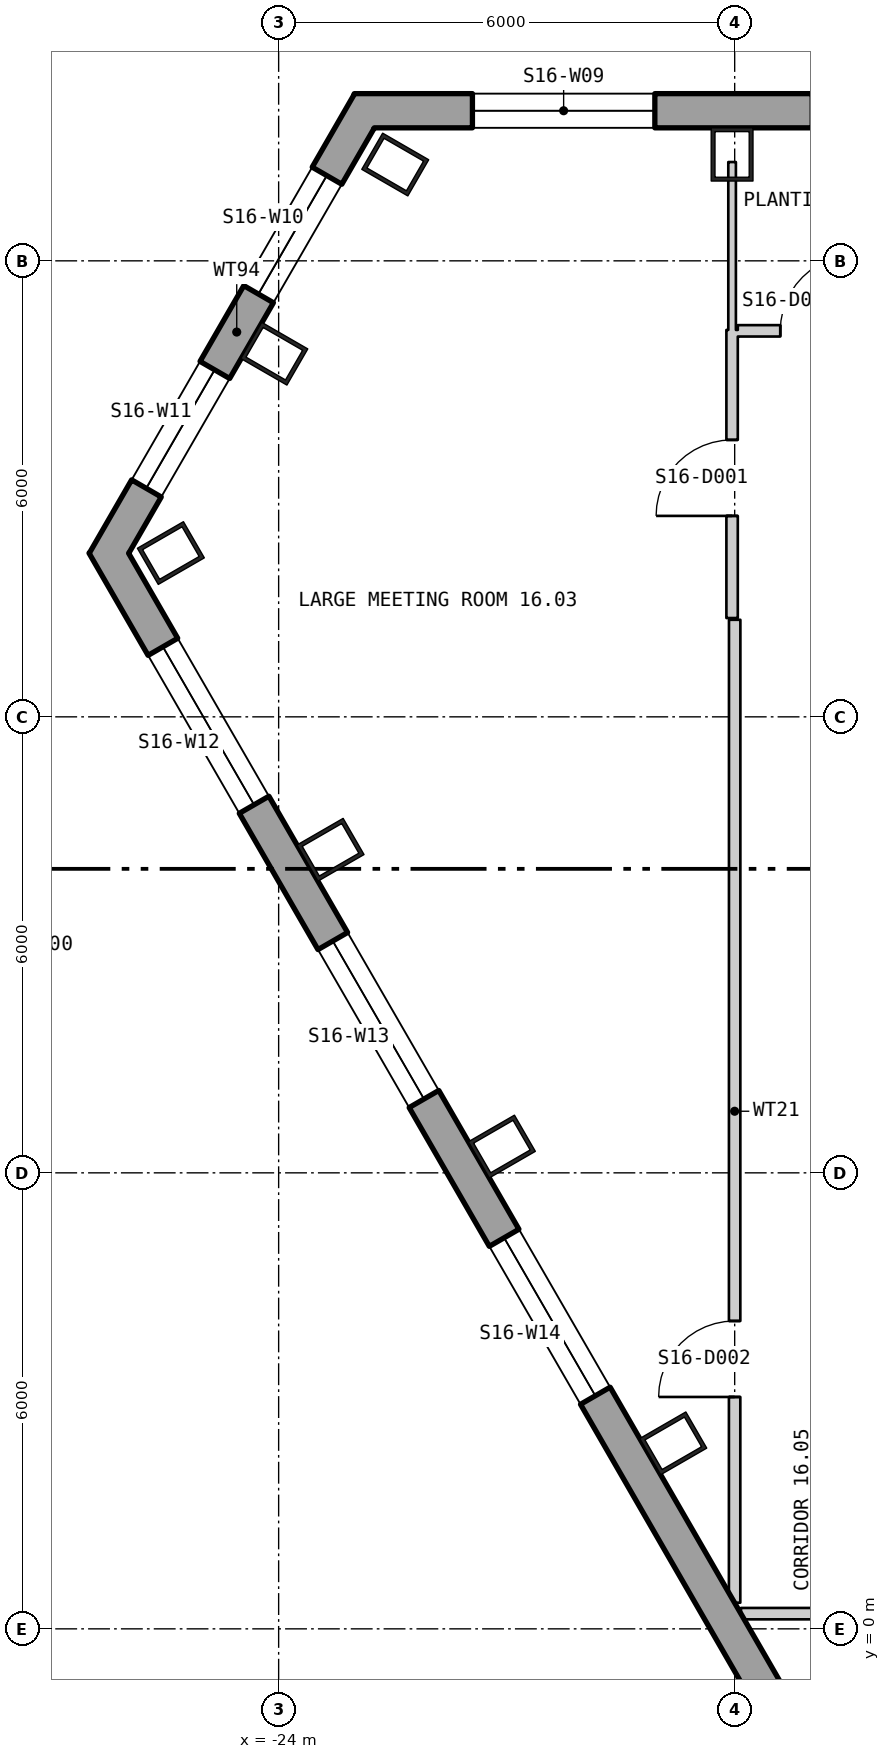
"""IFC4 building model, lengths in metres.
Left out: names, types, materials, properties, quantities, classifications, styles, units other than length and angle.
Written with IfcOpenShell. Run it as: python <this file> out.ifc"""

import sys

from ifc_helpers import new_model, si_unit, direction, frame, frame_2d, origin, origin_2d, place, context, subcontext, project, spatial, polyline, rectangle, hollow_rectangle, outline, extrude, element, fill, save


model = new_model("IFC4")
c1 = context("Model", 3, precision=1e-05, world=origin(), true_north=direction((0.0, 1.0)))
c2 = subcontext(c1, "Body", "Model", "MODEL_VIEW")
j1 = project(units=[si_unit("LENGTHUNIT", "METRE"), si_unit("PLANEANGLEUNIT", "RADIAN")], contexts=[c1])
p1 = place(None, origin())
s1 = spatial("IfcSite", under=j1, at=p1, CompositionType="ELEMENT")
p2 = place(p1, origin())
s2 = spatial("IfcBuilding", under=s1, at=p2, CompositionType="ELEMENT")
p3 = place(p2, frame((0.0, 0.0, 216.0)))
s3 = spatial("IfcBuildingStorey", under=s2, at=p3, CompositionType="ELEMENT", Elevation=216.0)
for number, where, z_axis, x_axis in (
    (1, (-18.034, 19.4, 0.0), (0.0, 0.0, 1.0), (-1.0, 0.0, 0.0)),
    (2, (-22.466, 19.267, 0.0), (0.0, 0.0, 1.0), (-0.5, -0.866, 0.0)),
    (3, (-24.057, 16.778, 0.0), (0.0, 0.0, 1.0), (-0.5, -0.866, 0.0)),
    (4, (-25.418, 14.155, 0.0), (0.0, 0.0, 1.0), (0.5, -0.866, 0.0)),
    (5, (-23.317, 10.251, 0.0), (0.0, 0.0, 1.0), (0.5, -0.866, 0.0)),
    (6, (-21.063, 6.346, 0.0), (0.0, 0.0, 1.0), (0.5, -0.866, 0.0)),
    (7, (-18.808, 2.441, 0.0), (0.0, 0.0, 1.0), (0.5, -0.866, 0.0)),
):
    element("IfcColumn", number, at=place(p3, frame(where, z_axis=z_axis, x_axis=x_axis)), inside=s3, PredefinedType="COLUMN", context=c2, shape_type="SweptSolid", body=[
        extrude(hollow_rectangle(XDim=0.55, YDim=0.7, WallThickness=0.05, at=origin_2d()), origin(), (0.0, 0.0, 1.0), 3.9),
    ])
p4 = place(p3, frame((22.875, 19.975, -0.4), z_axis=(0.0, 0.0, 1.0), x_axis=(-1.0, 0.0, 0.0)))
e8 = element("IfcWall", 8, at=p4, inside=s3, PredefinedType="SOLIDWALL", context=c2, shape_type="SweptSolid", body=[
    extrude(outline(polyline([(-0.13, -0.225), (45.88, -0.225), (45.62, 0.225), (0.13, 0.225), (-0.13, -0.225)])), origin(), (0.0, 0.0, 1.0), 3.9),
])
p5 = place(p4, frame((1.425, 0.0, 1.3)))
e9 = element("IfcOpeningElement", 9, at=p5, cuts=e8, PredefinedType="OPENING", context=c2, shape_type="SweptSolid", body=[
    extrude(rectangle(XDim=2.4, YDim=2.0, at=frame_2d((1.2, 1.0))), frame((0.0, 0.235, 0.0), z_axis=(0.0, -1.0, 0.0), x_axis=(1.0, 0.0, 0.0)), (0.0, 0.0, 1.0), 0.47),
])
p6 = place(p4, frame((10.403, 0.0, 1.3)))
e10 = element("IfcOpeningElement", 10, at=p6, cuts=e8, PredefinedType="OPENING", context=c2, shape_type="SweptSolid", body=[
    extrude(rectangle(XDim=2.4, YDim=2.0, at=frame_2d((1.2, 1.0))), frame((0.0, 0.235, 0.0), z_axis=(0.0, -1.0, 0.0), x_axis=(1.0, 0.0, 0.0)), (0.0, 0.0, 1.0), 0.47),
])
p7 = place(p4, frame((14.912, 0.0, 1.3)))
e11 = element("IfcOpeningElement", 11, at=p7, cuts=e8, PredefinedType="OPENING", context=c2, shape_type="SweptSolid", body=[
    extrude(rectangle(XDim=2.4, YDim=2.0, at=frame_2d((1.2, 1.0))), frame((0.0, 0.235, 0.0), z_axis=(0.0, -1.0, 0.0), x_axis=(1.0, 0.0, 0.0)), (0.0, 0.0, 1.0), 0.47),
])
p8 = place(p4, frame((19.421, 0.0, 1.3)))
e12 = element("IfcOpeningElement", 12, at=p8, cuts=e8, PredefinedType="OPENING", context=c2, shape_type="SweptSolid", body=[
    extrude(rectangle(XDim=2.4, YDim=2.0, at=frame_2d((1.2, 1.0))), frame((0.0, 0.235, 0.0), z_axis=(0.0, -1.0, 0.0), x_axis=(1.0, 0.0, 0.0)), (0.0, 0.0, 1.0), 0.47),
])
p9 = place(p4, frame((23.929, 0.0, 1.3)))
e13 = element("IfcOpeningElement", 13, at=p9, cuts=e8, PredefinedType="OPENING", context=c2, shape_type="SweptSolid", body=[
    extrude(rectangle(XDim=2.4, YDim=2.0, at=frame_2d((1.2, 1.0))), frame((0.0, 0.235, 0.0), z_axis=(0.0, -1.0, 0.0), x_axis=(1.0, 0.0, 0.0)), (0.0, 0.0, 1.0), 0.47),
])
p10 = place(p4, frame((28.438, 0.0, 1.3)))
e14 = element("IfcOpeningElement", 14, at=p10, cuts=e8, PredefinedType="OPENING", context=c2, shape_type="SweptSolid", body=[
    extrude(rectangle(XDim=2.4, YDim=2.0, at=frame_2d((1.2, 1.0))), frame((0.0, 0.235, 0.0), z_axis=(0.0, -1.0, 0.0), x_axis=(1.0, 0.0, 0.0)), (0.0, 0.0, 1.0), 0.47),
])
p11 = place(p4, frame((32.947, 0.0, 1.3)))
e15 = element("IfcOpeningElement", 15, at=p11, cuts=e8, PredefinedType="OPENING", context=c2, shape_type="SweptSolid", body=[
    extrude(rectangle(XDim=2.4, YDim=2.0, at=frame_2d((1.2, 1.0))), frame((0.0, 0.235, 0.0), z_axis=(0.0, -1.0, 0.0), x_axis=(1.0, 0.0, 0.0)), (0.0, 0.0, 1.0), 0.47),
])
p12 = place(p4, frame((37.455, 0.0, 1.3)))
e16 = element("IfcOpeningElement", 16, at=p12, cuts=e8, PredefinedType="OPENING", context=c2, shape_type="SweptSolid", body=[
    extrude(rectangle(XDim=2.4, YDim=2.0, at=frame_2d((1.2, 1.0))), frame((0.0, 0.235, 0.0), z_axis=(0.0, -1.0, 0.0), x_axis=(1.0, 0.0, 0.0)), (0.0, 0.0, 1.0), 0.47),
])
p13 = place(p4, frame((41.925, 0.0, 1.3)))
e17 = element("IfcOpeningElement", 17, at=p13, cuts=e8, PredefinedType="OPENING", context=c2, shape_type="SweptSolid", body=[
    extrude(rectangle(XDim=2.4, YDim=2.0, at=frame_2d((1.2, 1.0))), frame((0.0, 0.235, 0.0), z_axis=(0.0, -1.0, 0.0), x_axis=(1.0, 0.0, 0.0)), (0.0, 0.0, 1.0), 0.47),
])
p14 = place(p3, frame((-22.871, 19.973, -0.4), z_axis=(0.0, 0.0, 1.0), x_axis=(-0.500004118585, -0.866023025905, 0.0)))
e18 = element("IfcWall", 18, at=p14, inside=s3, PredefinedType="SOLIDWALL", context=c2, shape_type="SweptSolid", body=[
    extrude(outline(polyline([(-0.13, -0.225), (6.85, -0.225), (6.59, 0.225), (0.13, 0.225), (-0.13, -0.225)])), origin(), (0.0, 0.0, 1.0), 3.9),
])
p15 = place(p14, frame((0.984, 0.0, 1.3)))
e19 = element("IfcOpeningElement", 19, at=p15, cuts=e18, PredefinedType="OPENING", context=c2, shape_type="SweptSolid", body=[
    extrude(rectangle(XDim=1.8, YDim=2.0, at=frame_2d((0.9, 1.0))), frame((0.0, 0.235, 0.0), z_axis=(0.0, -1.0, 0.0), x_axis=(1.0, 0.0, 0.0)), (0.0, 0.0, 1.0), 0.47),
])
p16 = place(p14, frame((3.936, 0.0, 1.3)))
e20 = element("IfcOpeningElement", 20, at=p16, cuts=e18, PredefinedType="OPENING", context=c2, shape_type="SweptSolid", body=[
    extrude(rectangle(XDim=1.8, YDim=2.0, at=frame_2d((0.9, 1.0))), frame((0.0, 0.235, 0.0), z_axis=(0.0, -1.0, 0.0), x_axis=(1.0, 0.0, 0.0)), (0.0, 0.0, 1.0), 0.47),
])
p17 = place(p3, frame((-26.235, 14.155, -0.18), z_axis=(0.0, 0.0, 1.0), x_axis=(0.500000335318, -0.866025210188, 0.0)))
e21 = element("IfcWall", 21, at=p17, inside=s3, PredefinedType="SOLIDWALL", context=c2, shape_type="SweptSolid", body=[
    extrude(outline(polyline([(-0.13, -0.225), (45.88, -0.225), (45.62, 0.225), (0.13, 0.225), (-0.13, -0.225)])), origin(), (0.0, 0.0, 1.0), 3.68),
])
p18 = place(p17, frame((1.425, 0.0, 1.08)))
e22 = element("IfcOpeningElement", 22, at=p18, cuts=e21, PredefinedType="OPENING", context=c2, shape_type="SweptSolid", body=[
    extrude(rectangle(XDim=2.4, YDim=2.0, at=frame_2d((1.2, 1.0))), frame((0.0, 0.235, 0.0), z_axis=(0.0, -1.0, 0.0), x_axis=(1.0, 0.0, 0.0)), (0.0, 0.0, 1.0), 0.47),
])
p19 = place(p17, frame((5.895, 0.0, 1.08)))
e23 = element("IfcOpeningElement", 23, at=p19, cuts=e21, PredefinedType="OPENING", context=c2, shape_type="SweptSolid", body=[
    extrude(rectangle(XDim=2.4, YDim=2.0, at=frame_2d((1.2, 1.0))), frame((0.0, 0.235, 0.0), z_axis=(0.0, -1.0, 0.0), x_axis=(1.0, 0.0, 0.0)), (0.0, 0.0, 1.0), 0.47),
])
p20 = place(p17, frame((10.403, 0.0, 1.08)))
e24 = element("IfcOpeningElement", 24, at=p20, cuts=e21, PredefinedType="OPENING", context=c2, shape_type="SweptSolid", body=[
    extrude(rectangle(XDim=2.4, YDim=2.0, at=frame_2d((1.2, 1.0))), frame((0.0, 0.235, 0.0), z_axis=(0.0, -1.0, 0.0), x_axis=(1.0, 0.0, 0.0)), (0.0, 0.0, 1.0), 0.47),
])
p21 = place(p17, frame((19.421, 0.0, 1.08)))
e25 = element("IfcOpeningElement", 25, at=p21, cuts=e21, PredefinedType="OPENING", context=c2, shape_type="SweptSolid", body=[
    extrude(rectangle(XDim=2.4, YDim=2.0, at=frame_2d((1.2, 1.0))), frame((0.0, 0.235, 0.0), z_axis=(0.0, -1.0, 0.0), x_axis=(1.0, 0.0, 0.0)), (0.0, 0.0, 1.0), 0.47),
])
p22 = place(p17, frame((23.929, 0.0, 1.08)))
e26 = element("IfcOpeningElement", 26, at=p22, cuts=e21, PredefinedType="OPENING", context=c2, shape_type="SweptSolid", body=[
    extrude(rectangle(XDim=2.4, YDim=2.0, at=frame_2d((1.2, 1.0))), frame((0.0, 0.235, 0.0), z_axis=(0.0, -1.0, 0.0), x_axis=(1.0, 0.0, 0.0)), (0.0, 0.0, 1.0), 0.47),
])
p23 = place(p17, frame((28.438, 0.0, 1.08)))
e27 = element("IfcOpeningElement", 27, at=p23, cuts=e21, PredefinedType="OPENING", context=c2, shape_type="SweptSolid", body=[
    extrude(rectangle(XDim=2.4, YDim=2.0, at=frame_2d((1.2, 1.0))), frame((0.0, 0.235, 0.0), z_axis=(0.0, -1.0, 0.0), x_axis=(1.0, 0.0, 0.0)), (0.0, 0.0, 1.0), 0.47),
])
p24 = place(p17, frame((32.947, 0.0, 1.08)))
e28 = element("IfcOpeningElement", 28, at=p24, cuts=e21, PredefinedType="OPENING", context=c2, shape_type="SweptSolid", body=[
    extrude(rectangle(XDim=2.4, YDim=2.0, at=frame_2d((1.2, 1.0))), frame((0.0, 0.235, 0.0), z_axis=(0.0, -1.0, 0.0), x_axis=(1.0, 0.0, 0.0)), (0.0, 0.0, 1.0), 0.47),
])
p25 = place(p17, frame((41.925, 0.0, 1.08)))
e29 = element("IfcOpeningElement", 29, at=p25, cuts=e21, PredefinedType="OPENING", context=c2, shape_type="SweptSolid", body=[
    extrude(rectangle(XDim=2.4, YDim=2.0, at=frame_2d((1.2, 1.0))), frame((0.0, 0.235, 0.0), z_axis=(0.0, -1.0, 0.0), x_axis=(1.0, 0.0, 0.0)), (0.0, 0.0, 1.0), 0.47),
])
p26 = place(p3, frame((-18.034, 13.3, 0.0), z_axis=(0.0, 0.0, 1.0), x_axis=(0.0, 1.0, 0.0)))
e30 = element("IfcWall", 30, at=p26, inside=s3, PredefinedType="PARTITIONING", context=c2, shape_type="SweptSolid", body=[
    extrude(rectangle(XDim=3.791, YDim=0.15, at=frame_2d((1.895, 0.0))), origin(), (0.0, 0.0, 1.0), 3.7),
])
p27 = place(p26, frame((1.344, 0.0, 0.0)))
e31 = element("IfcOpeningElement", 31, at=p27, cuts=e30, PredefinedType="OPENING", context=c2, shape_type="SweptSolid", body=[
    extrude(rectangle(XDim=1.0, YDim=2.1, at=frame_2d((0.5, 1.05))), frame((0.0, 0.085, 0.0), z_axis=(0.0, -1.0, 0.0), x_axis=(1.0, 0.0, 0.0)), (0.0, 0.0, 1.0), 0.17),
])
p28 = place(p3, frame((-18.034, 17.091, 0.0), z_axis=(0.0, 0.0, 1.0), x_axis=(0.0, 1.0, 0.0)))
e32 = element("IfcWall", 32, at=p28, inside=s3, PredefinedType="PARTITIONING", context=c2, shape_type="SweptSolid", body=[
    extrude(rectangle(XDim=2.209, YDim=0.1, at=frame_2d((1.105, 0.0))), origin(), (0.0, 0.0, 1.0), 3.7),
])
p29 = place(p3, frame((-18.001, 0.344, 0.0), z_axis=(0.0, 0.0, 1.0), x_axis=(7.732158e-05, 0.999999997011, 0.0)))
e33 = element("IfcWall", 33, at=p29, inside=s3, PredefinedType="PARTITIONING", context=c2, shape_type="SweptSolid", body=[
    extrude(rectangle(XDim=12.933, YDim=0.15, at=frame_2d((6.466, 0.0))), origin(), (0.0, 0.0, 1.0), 3.7),
])
p30 = place(p29, frame((2.707, 0.0, 0.0)))
e34 = element("IfcOpeningElement", 34, at=p30, cuts=e33, PredefinedType="OPENING", context=c2, shape_type="SweptSolid", body=[
    extrude(rectangle(XDim=1.0, YDim=2.1, at=frame_2d((0.5, 1.05))), frame((0.0, 0.085, 0.0), z_axis=(0.0, -1.0, 0.0), x_axis=(1.0, 0.0, 0.0)), (0.0, 0.0, 1.0), 0.17),
])
p31 = place(p3, frame((-17.959, 17.079, 0.0), z_axis=(0.0, 0.0, 1.0), x_axis=(1.0, 0.0, 0.0)))
e35 = element("IfcWall", 35, at=p31, inside=s3, PredefinedType="PARTITIONING", context=c2, shape_type="SweptSolid", body=[
    extrude(rectangle(XDim=1.759, YDim=0.15, at=frame_2d((0.879, 0.0))), origin(), (0.0, 0.0, 1.0), 3.7),
])
p32 = place(p31, frame((0.559, 0.0, 0.0)))
e36 = element("IfcOpeningElement", 36, at=p32, cuts=e35, PredefinedType="OPENING", context=c2, shape_type="SweptSolid", body=[
    extrude(rectangle(XDim=1.0, YDim=2.1, at=frame_2d((0.5, 1.05))), frame((0.0, 0.085, 0.0), z_axis=(0.0, -1.0, 0.0), x_axis=(1.0, 0.0, 0.0)), (0.0, 0.0, 1.0), 0.17),
])
p33 = place(p3, frame((-17.918, 0.2, 0.0), z_axis=(0.0, 0.0, 1.0), x_axis=(0.999999995937, 9.0146939e-05, 0.0)))
e37 = element("IfcWall", 37, at=p33, inside=s3, PredefinedType="PARTITIONING", context=c2, shape_type="SweptSolid", body=[
    extrude(rectangle(XDim=11.093, YDim=0.15, at=frame_2d((5.546, 0.0))), origin(), (0.0, 0.0, 1.0), 3.7),
])
p34 = place(p33, frame((9.73, 0.0, 0.0)))
e38 = element("IfcOpeningElement", 38, at=p34, cuts=e37, PredefinedType="OPENING", context=c2, shape_type="SweptSolid", body=[
    extrude(rectangle(XDim=1.0, YDim=2.1, at=frame_2d((0.5, 1.05))), frame((0.0, 0.085, 0.0), z_axis=(0.0, -1.0, 0.0), x_axis=(1.0, 0.0, 0.0)), (0.0, 0.0, 1.0), 0.17),
])
p35 = place(p13, origin())
e39 = element("IfcWindow", 39, at=p35, inside=s3, PartitioningType="SINGLE_PANEL", PredefinedType="WINDOW", context=c2, shape_type="SweptSolid", body=[
    extrude(rectangle(XDim=2.4, YDim=2.0, at=frame_2d((1.2, 1.0))), frame((0.0, 0.105, 0.0), z_axis=(0.0, -1.0, 0.0), x_axis=(1.0, 0.0, 0.0)), (0.0, 0.0, 1.0), 0.06),
])
fill(e17, e39)
p36 = place(p15, origin())
e40 = element("IfcWindow", 40, at=p36, inside=s3, PartitioningType="SINGLE_PANEL", PredefinedType="WINDOW", context=c2, shape_type="SweptSolid", body=[
    extrude(rectangle(XDim=1.8, YDim=2.0, at=frame_2d((0.9, 1.0))), frame((0.0, 0.105, 0.0), z_axis=(0.0, -1.0, 0.0), x_axis=(1.0, 0.0, 0.0)), (0.0, 0.0, 1.0), 0.06),
])
fill(e19, e40)
p37 = place(p16, origin())
e41 = element("IfcWindow", 41, at=p37, inside=s3, PartitioningType="SINGLE_PANEL", PredefinedType="WINDOW", context=c2, shape_type="SweptSolid", body=[
    extrude(rectangle(XDim=1.8, YDim=2.0, at=frame_2d((0.9, 1.0))), frame((0.0, 0.105, 0.0), z_axis=(0.0, -1.0, 0.0), x_axis=(1.0, 0.0, 0.0)), (0.0, 0.0, 1.0), 0.06),
])
fill(e20, e41)
p38 = place(p18, origin())
e42 = element("IfcWindow", 42, at=p38, inside=s3, PartitioningType="SINGLE_PANEL", PredefinedType="WINDOW", context=c2, shape_type="SweptSolid", body=[
    extrude(rectangle(XDim=2.4, YDim=2.0, at=frame_2d((1.2, 1.0))), frame((0.0, 0.105, 0.0), z_axis=(0.0, -1.0, 0.0), x_axis=(1.0, 0.0, 0.0)), (0.0, 0.0, 1.0), 0.06),
])
fill(e22, e42)
p39 = place(p19, origin())
e43 = element("IfcWindow", 43, at=p39, inside=s3, PartitioningType="SINGLE_PANEL", PredefinedType="WINDOW", context=c2, shape_type="SweptSolid", body=[
    extrude(rectangle(XDim=2.4, YDim=2.0, at=frame_2d((1.2, 1.0))), frame((0.0, 0.105, 0.0), z_axis=(0.0, -1.0, 0.0), x_axis=(1.0, 0.0, 0.0)), (0.0, 0.0, 1.0), 0.06),
])
fill(e23, e43)
p40 = place(p20, origin())
e44 = element("IfcWindow", 44, at=p40, inside=s3, PartitioningType="SINGLE_PANEL", PredefinedType="WINDOW", context=c2, shape_type="SweptSolid", body=[
    extrude(rectangle(XDim=2.4, YDim=2.0, at=frame_2d((1.2, 1.0))), frame((0.0, 0.105, 0.0), z_axis=(0.0, -1.0, 0.0), x_axis=(1.0, 0.0, 0.0)), (0.0, 0.0, 1.0), 0.06),
])
fill(e24, e44)
p41 = place(p27, origin())
e45 = element("IfcDoor", 45, at=p41, inside=s3, OperationType="SINGLE_SWING_RIGHT", PredefinedType="DOOR", context=c2, shape_type="SweptSolid", body=[
    extrude(rectangle(XDim=1.0, YDim=2.1, at=frame_2d((0.5, 1.05))), frame((0.0, 0.025, 0.0), z_axis=(0.0, -1.0, 0.0), x_axis=(1.0, 0.0, 0.0)), (0.0, 0.0, 1.0), 0.05),
])
fill(e31, e45)
p42 = place(p30, origin())
e46 = element("IfcDoor", 46, at=p42, inside=s3, OperationType="SINGLE_SWING_RIGHT", PredefinedType="DOOR", context=c2, shape_type="SweptSolid", body=[
    extrude(rectangle(XDim=1.0, YDim=2.1, at=frame_2d((0.5, 1.05))), frame((0.0, 0.025, 0.0), z_axis=(0.0, -1.0, 0.0), x_axis=(1.0, 0.0, 0.0)), (0.0, 0.0, 1.0), 0.05),
])
fill(e34, e46)
p43 = place(p32, origin())
e47 = element("IfcDoor", 47, at=p43, inside=s3, OperationType="SINGLE_SWING_LEFT", PredefinedType="DOOR", context=c2, shape_type="SweptSolid", body=[
    extrude(rectangle(XDim=1.0, YDim=2.1, at=frame_2d((0.5, 1.05))), frame((0.0, 0.025, 0.0), z_axis=(0.0, -1.0, 0.0), x_axis=(1.0, 0.0, 0.0)), (0.0, 0.0, 1.0), 0.05),
])
fill(e36, e47)
save(model, sys.argv[1])
